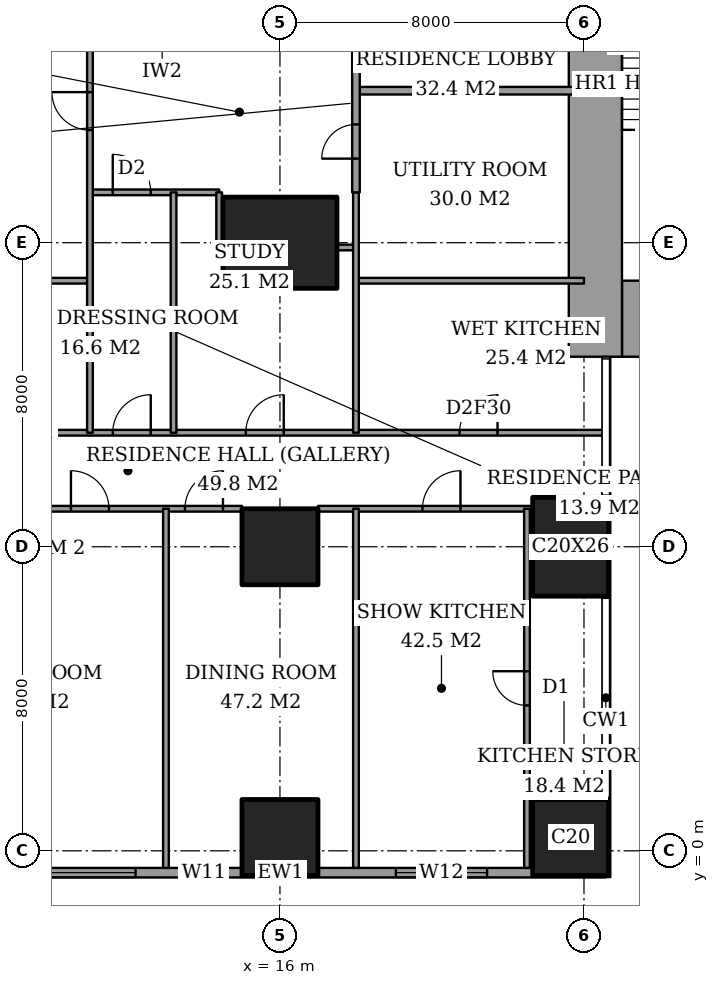
"""IFC4 building model, lengths in metres.
Left out: names, types, materials, properties, quantities, classifications, styles, units other than length and angle.
Written with IfcOpenShell. Run it as: python <this file> out.ifc"""

import sys

from ifc_helpers import new_model, si_unit, direction, frame, frame_2d, origin, origin_2d, place, context, subcontext, project, spatial, rectangle, extrude, element, fill, save


model = new_model("IFC4")
c1 = context("Model", 3, precision=1e-05, world=origin(), true_north=direction((0.0, 1.0)))
c2 = subcontext(c1, "Body", "Model", "MODEL_VIEW")
j1 = project(units=[si_unit("LENGTHUNIT", "METRE"), si_unit("PLANEANGLEUNIT", "RADIAN")], contexts=[c1])
p1 = place(None, origin())
s1 = spatial("IfcSite", under=j1, at=p1, CompositionType="ELEMENT")
p2 = place(p1, origin())
s2 = spatial("IfcBuilding", under=s1, at=p2, CompositionType="ELEMENT")
p3 = place(p2, frame((0.0, 0.0, 143.0)))
s3 = spatial("IfcBuildingStorey", under=s2, at=p3, CompositionType="ELEMENT", Elevation=143.0)
for number, where, z_axis, x_axis in (
    (1, (16.0, 0.35, 0.0), (0.0, 0.0, 1.0), (1.0, 0.0, 0.0)),
    (2, (16.0, 8.0, 0.0), (0.0, 0.0, 1.0), (1.0, 0.0, 0.0)),
):
    element("IfcColumn", number, at=place(p3, frame(where, z_axis=z_axis, x_axis=x_axis)), inside=s3, PredefinedType="COLUMN", context=c2, shape_type="SweptSolid", body=[
        extrude(rectangle(XDim=2.0, YDim=2.0, at=origin_2d()), origin(), (0.0, 0.0, 1.0), 3.6),
    ])
p4 = place(p3, frame((16.0, 16.0, 0.0), z_axis=(0.0, 0.0, 1.0), x_axis=(1.0, 0.0, 0.0)))
e3 = element("IfcColumn", 3, at=p4, inside=s3, PredefinedType="COLUMN", context=c2, shape_type="SweptSolid", body=[
    extrude(rectangle(XDim=3.0, YDim=2.4, at=origin_2d()), origin(), (0.0, 0.0, 1.0), 3.6),
])
p5 = place(p3, frame((23.65, 0.35, 0.0), z_axis=(0.0, 0.0, 1.0), x_axis=(1.0, 0.0, 0.0)))
e4 = element("IfcColumn", 4, at=p5, inside=s3, PredefinedType="COLUMN", context=c2, shape_type="SweptSolid", body=[
    extrude(rectangle(XDim=2.0, YDim=2.0, at=origin_2d()), origin(), (0.0, 0.0, 1.0), 3.6),
])
p6 = place(p3, frame((23.65, 8.0, 0.0), z_axis=(0.0, 0.0, 1.0), x_axis=(1.0, 0.0, 0.0)))
e5 = element("IfcColumn", 5, at=p6, inside=s3, PredefinedType="COLUMN", context=c2, shape_type="SweptSolid", body=[
    extrude(rectangle(XDim=2.0, YDim=2.6, at=origin_2d()), origin(), (0.0, 0.0, 1.0), 3.6),
])
p7 = place(p3, frame((25.0, 14.0, 0.0), z_axis=(0.0, 0.0, 1.0), x_axis=(1.0, 0.0, 0.0)))
e6 = element("IfcWall", 6, at=p7, inside=s3, PredefinedType="SHEAR", context=c2, shape_type="SweptSolid", body=[
    extrude(rectangle(XDim=3.15, YDim=2.0, at=frame_2d((1.575, 0.0))), origin(), (0.0, 0.0, 1.0), 3.6),
])
p8 = place(p3, frame((24.3, 13.0, 0.0), z_axis=(0.0, 0.0, 1.0), x_axis=(0.0, 1.0, 0.0)))
e7 = element("IfcWall", 7, at=p8, inside=s3, PredefinedType="SHEAR", context=c2, shape_type="SweptSolid", body=[
    extrude(rectangle(XDim=10.15, YDim=1.4, at=frame_2d((5.075, 0.0))), origin(), (0.0, 0.0, 1.0), 3.6),
])
p9 = place(p3, frame((3.175, -0.575, 0.0), z_axis=(0.0, 0.0, 1.0), x_axis=(1.0, 0.0, 0.0)))
e8 = element("IfcWall", 8, at=p9, inside=s3, PredefinedType="SOLIDWALL", context=c2, shape_type="SweptSolid", body=[
    extrude(rectangle(XDim=21.4, YDim=0.25, at=frame_2d((10.7, 0.0))), origin(), (0.0, 0.0, 1.0), 3.6),
])
p10 = place(p9, frame((0.775, 0.0, 0.4)))
e9 = element("IfcOpeningElement", 9, at=p10, cuts=e8, PredefinedType="OPENING", context=c2, shape_type="SweptSolid", body=[
    extrude(rectangle(XDim=1.2, YDim=2.2, at=frame_2d((0.6, 1.1))), frame((0.0, 0.135, 0.0), z_axis=(0.0, -1.0, 0.0), x_axis=(1.0, 0.0, 0.0)), (0.0, 0.0, 1.0), 0.27),
])
p11 = place(p9, frame((6.625, 0.0, 0.4)))
e10 = element("IfcOpeningElement", 10, at=p11, cuts=e8, PredefinedType="OPENING", context=c2, shape_type="SweptSolid", body=[
    extrude(rectangle(XDim=2.4, YDim=2.2, at=frame_2d((1.2, 1.1))), frame((0.0, 0.135, 0.0), z_axis=(0.0, -1.0, 0.0), x_axis=(1.0, 0.0, 0.0)), (0.0, 0.0, 1.0), 0.27),
])
p12 = place(p9, frame((10.225, 0.0, 0.4)))
e11 = element("IfcOpeningElement", 11, at=p12, cuts=e8, PredefinedType="OPENING", context=c2, shape_type="SweptSolid", body=[
    extrude(rectangle(XDim=1.2, YDim=2.2, at=frame_2d((0.6, 1.1))), frame((0.0, 0.135, 0.0), z_axis=(0.0, -1.0, 0.0), x_axis=(1.0, 0.0, 0.0)), (0.0, 0.0, 1.0), 0.27),
])
p13 = place(p9, frame((15.875, 0.0, 0.4)))
e12 = element("IfcOpeningElement", 12, at=p13, cuts=e8, PredefinedType="OPENING", context=c2, shape_type="SweptSolid", body=[
    extrude(rectangle(XDim=2.4, YDim=2.2, at=frame_2d((1.2, 1.1))), frame((0.0, 0.135, 0.0), z_axis=(0.0, -1.0, 0.0), x_axis=(1.0, 0.0, 0.0)), (0.0, 0.0, 1.0), 0.27),
])
p14 = place(p3, frame((9.0, 9.0, 0.0), z_axis=(0.0, 0.0, 1.0), x_axis=(1.0, 0.0, 0.0)))
e13 = element("IfcWall", 13, at=p14, inside=s3, PredefinedType="PARTITIONING", context=c2, shape_type="SweptSolid", body=[
    extrude(rectangle(XDim=6.0, YDim=0.15, at=frame_2d((3.0, 0.0))), origin(), (0.0, 0.0, 1.0), 3.35),
])
p15 = place(p14, frame((1.5, 0.0, 0.0)))
e14 = element("IfcOpeningElement", 14, at=p15, cuts=e13, PredefinedType="OPENING", context=c2, shape_type="SweptSolid", body=[
    extrude(rectangle(XDim=1.0, YDim=2.1, at=frame_2d((0.5, 1.05))), frame((0.0, 0.085, 0.0), z_axis=(0.0, -1.0, 0.0), x_axis=(1.0, 0.0, 0.0)), (0.0, 0.0, 1.0), 0.17),
])
p16 = place(p14, frame((4.5, 0.0, 0.0)))
e15 = element("IfcOpeningElement", 15, at=p16, cuts=e13, PredefinedType="OPENING", context=c2, shape_type="SweptSolid", body=[
    extrude(rectangle(XDim=1.0, YDim=2.1, at=frame_2d((0.5, 1.05))), frame((0.0, 0.085, 0.0), z_axis=(0.0, -1.0, 0.0), x_axis=(1.0, 0.0, 0.0)), (0.0, 0.0, 1.0), 0.17),
])
p17 = place(p3, frame((17.0, 9.0, 0.0), z_axis=(0.0, 0.0, 1.0), x_axis=(1.0, 0.0, 0.0)))
e16 = element("IfcWall", 16, at=p17, inside=s3, PredefinedType="PARTITIONING", context=c2, shape_type="SweptSolid", body=[
    extrude(rectangle(XDim=5.65, YDim=0.15, at=frame_2d((2.825, 0.0))), origin(), (0.0, 0.0, 1.0), 3.35),
])
p18 = place(p17, frame((2.75, 0.0, 0.0)))
e17 = element("IfcOpeningElement", 17, at=p18, cuts=e16, PredefinedType="OPENING", context=c2, shape_type="SweptSolid", body=[
    extrude(rectangle(XDim=1.0, YDim=2.1, at=frame_2d((0.5, 1.05))), frame((0.0, 0.085, 0.0), z_axis=(0.0, -1.0, 0.0), x_axis=(1.0, 0.0, 0.0)), (0.0, 0.0, 1.0), 0.17),
])
p19 = place(p3, frame((-0.45, 11.0, 0.0), z_axis=(0.0, 0.0, 1.0), x_axis=(1.0, 0.0, 0.0)))
e18 = element("IfcWall", 18, at=p19, inside=s3, PredefinedType="PARTITIONING", context=c2, shape_type="SweptSolid", body=[
    extrude(rectangle(XDim=25.011, YDim=0.15, at=frame_2d((12.505, 0.0))), origin(), (0.0, 0.0, 1.0), 3.35),
])
p20 = place(p19, frame((12.05, 0.0, 0.0)))
e19 = element("IfcOpeningElement", 19, at=p20, cuts=e18, PredefinedType="OPENING", context=c2, shape_type="SweptSolid", body=[
    extrude(rectangle(XDim=1.0, YDim=2.1, at=frame_2d((0.5, 1.05))), frame((0.0, 0.085, 0.0), z_axis=(0.0, -1.0, 0.0), x_axis=(1.0, 0.0, 0.0)), (0.0, 0.0, 1.0), 0.17),
])
p21 = place(p19, frame((3.087, 0.0, 0.0)))
e20 = element("IfcOpeningElement", 20, at=p21, cuts=e18, PredefinedType="OPENING", context=c2, shape_type="SweptSolid", body=[
    extrude(rectangle(XDim=1.0, YDim=2.1, at=frame_2d((0.5, 1.05))), frame((0.0, 0.085, 0.0), z_axis=(0.0, -1.0, 0.0), x_axis=(1.0, 0.0, 0.0)), (0.0, 0.0, 1.0), 0.17),
])
p22 = place(p19, frame((15.55, 0.0, 0.0)))
e21 = element("IfcOpeningElement", 21, at=p22, cuts=e18, PredefinedType="OPENING", context=c2, shape_type="SweptSolid", body=[
    extrude(rectangle(XDim=1.0, YDim=2.1, at=frame_2d((0.5, 1.05))), frame((0.0, 0.085, 0.0), z_axis=(0.0, -1.0, 0.0), x_axis=(1.0, 0.0, 0.0)), (0.0, 0.0, 1.0), 0.17),
])
p23 = place(p19, frame((21.175, 0.0, 0.0)))
e22 = element("IfcOpeningElement", 22, at=p23, cuts=e18, PredefinedType="OPENING", context=c2, shape_type="SweptSolid", body=[
    extrude(rectangle(XDim=1.0, YDim=2.1, at=frame_2d((0.5, 1.05))), frame((0.0, 0.085, 0.0), z_axis=(0.0, -1.0, 0.0), x_axis=(1.0, 0.0, 0.0)), (0.0, 0.0, 1.0), 0.17),
])
p24 = place(p3, frame((9.5, 15.0, 0.0), z_axis=(0.0, 0.0, 1.0), x_axis=(1.0, 0.0, 0.0)))
e23 = element("IfcWall", 23, at=p24, inside=s3, PredefinedType="PARTITIONING", context=c2, shape_type="SweptSolid", body=[
    extrude(rectangle(XDim=1.5, YDim=0.15, at=frame_2d((0.75, 0.0))), origin(), (0.0, 0.0, 1.0), 3.35),
])
p25 = place(p3, frame((18.0, 15.0, 0.0), z_axis=(0.0, 0.0, 1.0), x_axis=(1.0, 0.0, 0.0)))
e24 = element("IfcWall", 24, at=p25, inside=s3, PredefinedType="PARTITIONING", context=c2, shape_type="SweptSolid", body=[
    extrude(rectangle(XDim=6.0, YDim=0.15, at=frame_2d((3.0, 0.0))), origin(), (0.0, 0.0, 1.0), 3.35),
])
p26 = place(p3, frame((17.5, 15.875, 0.0), z_axis=(0.0, 0.0, 1.0), x_axis=(1.0, 0.0, 0.0)))
e25 = element("IfcWall", 25, at=p26, inside=s3, PredefinedType="PARTITIONING", context=c2, shape_type="SweptSolid", body=[
    extrude(rectangle(XDim=0.5, YDim=0.15, at=frame_2d((0.25, 0.0))), origin(), (0.0, 0.0, 1.0), 2.634),
])
p27 = place(p3, frame((11.0, 17.325, 0.0), z_axis=(0.0, 0.0, 1.0), x_axis=(1.0, 0.0, 0.0)))
e26 = element("IfcWall", 26, at=p27, inside=s3, PredefinedType="PARTITIONING", context=c2, shape_type="SweptSolid", body=[
    extrude(rectangle(XDim=3.4, YDim=0.15, at=frame_2d((1.7, 0.0))), origin(), (0.0, 0.0, 1.0), 3.35),
])
p28 = place(p27, frame((0.6, 0.0, 0.0)))
e27 = element("IfcOpeningElement", 27, at=p28, cuts=e26, PredefinedType="OPENING", context=c2, shape_type="SweptSolid", body=[
    extrude(rectangle(XDim=1.0, YDim=2.1, at=frame_2d((0.5, 1.05))), frame((0.0, 0.085, 0.0), z_axis=(0.0, -1.0, 0.0), x_axis=(1.0, 0.0, 0.0)), (0.0, 0.0, 1.0), 0.17),
])
p29 = place(p3, frame((18.0, 20.0, 0.0), z_axis=(0.0, 0.0, 1.0), x_axis=(1.0, 0.0, 0.0)))
e28 = element("IfcWall", 28, at=p29, inside=s3, PredefinedType="PARTITIONING", context=c2, shape_type="SweptSolid", body=[
    extrude(rectangle(XDim=6.0, YDim=0.2, at=frame_2d((3.0, 0.0))), origin(), (0.0, 0.0, 1.0), 3.35),
])
p30 = place(p3, frame((11.0, 11.0, 0.0), z_axis=(0.0, 0.0, 1.0), x_axis=(0.0, 1.0, 0.0)))
e29 = element("IfcWall", 29, at=p30, inside=s3, PredefinedType="PARTITIONING", context=c2, shape_type="SweptSolid", body=[
    extrude(rectangle(XDim=10.6, YDim=0.15, at=frame_2d((5.3, 0.0))), origin(), (0.0, 0.0, 1.0), 3.35),
])
p31 = place(p30, frame((7.962, 0.0, 0.0)))
e30 = element("IfcOpeningElement", 30, at=p31, cuts=e29, PredefinedType="OPENING", context=c2, shape_type="SweptSolid", body=[
    extrude(rectangle(XDim=1.0, YDim=2.1, at=frame_2d((0.5, 1.05))), frame((0.0, 0.085, 0.0), z_axis=(0.0, -1.0, 0.0), x_axis=(1.0, 0.0, 0.0)), (0.0, 0.0, 1.0), 0.17),
])
p32 = place(p3, frame((13.0, -0.45, 0.0), z_axis=(0.0, 0.0, 1.0), x_axis=(0.0, 1.0, 0.0)))
e31 = element("IfcWall", 31, at=p32, inside=s3, PredefinedType="PARTITIONING", context=c2, shape_type="SweptSolid", body=[
    extrude(rectangle(XDim=9.45, YDim=0.15, at=frame_2d((4.725, 0.0))), origin(), (0.0, 0.0, 1.0), 3.35),
])
p33 = place(p3, frame((13.2, 11.0, 0.0), z_axis=(0.0, 0.0, 1.0), x_axis=(0.0, 1.0, 0.0)))
e32 = element("IfcWall", 32, at=p33, inside=s3, PredefinedType="PARTITIONING", context=c2, shape_type="SweptSolid", body=[
    extrude(rectangle(XDim=6.325, YDim=0.15, at=frame_2d((3.163, 0.0))), origin(), (0.0, 0.0, 1.0), 3.35),
])
p34 = place(p3, frame((14.4, 15.875, 0.0), z_axis=(0.0, 0.0, 1.0), x_axis=(0.0, 1.0, 0.0)))
e33 = element("IfcWall", 33, at=p34, inside=s3, PredefinedType="PARTITIONING", context=c2, shape_type="SweptSolid", body=[
    extrude(rectangle(XDim=1.45, YDim=0.15, at=frame_2d((0.725, 0.0))), origin(), (0.0, 0.0, 1.0), 3.35),
])
p35 = place(p3, frame((18.0, 17.325, 0.0), z_axis=(0.0, 0.0, 1.0), x_axis=(0.0, 1.0, 0.0)))
e34 = element("IfcWall", 34, at=p35, inside=s3, PredefinedType="PARTITIONING", context=c2, shape_type="SweptSolid", body=[
    extrude(rectangle(XDim=6.675, YDim=0.2, at=frame_2d((3.337, 0.0))), origin(), (0.0, 0.0, 1.0), 3.35),
])
p36 = place(p35, frame((4.075, 0.0, 0.0)))
e35 = element("IfcOpeningElement", 35, at=p36, cuts=e34, PredefinedType="OPENING", context=c2, shape_type="SweptSolid", body=[
    extrude(rectangle(XDim=1.2, YDim=2.4, at=frame_2d((0.6, 1.2))), frame((0.0, 0.11, 0.0), z_axis=(0.0, -1.0, 0.0), x_axis=(1.0, 0.0, 0.0)), (0.0, 0.0, 1.0), 0.22),
])
p37 = place(p35, frame((0.887, 0.0, 0.0)))
e36 = element("IfcOpeningElement", 36, at=p37, cuts=e34, PredefinedType="OPENING", context=c2, shape_type="SweptSolid", body=[
    extrude(rectangle(XDim=0.9, YDim=2.1, at=frame_2d((0.45, 1.05))), frame((0.0, 0.11, 0.0), z_axis=(0.0, -1.0, 0.0), x_axis=(1.0, 0.0, 0.0)), (0.0, 0.0, 1.0), 0.22),
])
p38 = place(p3, frame((18.0, -0.45, 0.0), z_axis=(0.0, 0.0, 1.0), x_axis=(0.0, 1.0, 0.0)))
e37 = element("IfcWall", 37, at=p38, inside=s3, PredefinedType="PARTITIONING", context=c2, shape_type="SweptSolid", body=[
    extrude(rectangle(XDim=9.45, YDim=0.15, at=frame_2d((4.725, 0.0))), origin(), (0.0, 0.0, 1.0), 3.35),
])
p39 = place(p3, frame((18.0, 11.0, 0.0), z_axis=(0.0, 0.0, 1.0), x_axis=(0.0, 1.0, 0.0)))
e38 = element("IfcWall", 38, at=p39, inside=s3, PredefinedType="PARTITIONING", context=c2, shape_type="SweptSolid", body=[
    extrude(rectangle(XDim=6.325, YDim=0.15, at=frame_2d((3.163, 0.0))), origin(), (0.0, 0.0, 1.0), 3.35),
])
p40 = place(p3, frame((22.5, -0.45, 0.0), z_axis=(0.0, 0.0, 1.0), x_axis=(0.0, 1.0, 0.0)))
e39 = element("IfcWall", 39, at=p40, inside=s3, PredefinedType="PARTITIONING", context=c2, shape_type="SweptSolid", body=[
    extrude(rectangle(XDim=9.45, YDim=0.15, at=frame_2d((4.725, 0.0))), origin(), (0.0, 0.0, 1.0), 3.35),
])
p41 = place(p40, frame((4.275, 0.0, 0.0)))
e40 = element("IfcOpeningElement", 40, at=p41, cuts=e39, PredefinedType="OPENING", context=c2, shape_type="SweptSolid", body=[
    extrude(rectangle(XDim=0.9, YDim=2.1, at=frame_2d((0.45, 1.05))), frame((0.0, 0.085, 0.0), z_axis=(0.0, -1.0, 0.0), x_axis=(1.0, 0.0, 0.0)), (0.0, 0.0, 1.0), 0.17),
])
p42 = place(p11, origin())
e41 = element("IfcWindow", 41, at=p42, inside=s3, PartitioningType="SINGLE_PANEL", PredefinedType="WINDOW", context=c2, shape_type="SweptSolid", body=[
    extrude(rectangle(XDim=2.4, YDim=2.2, at=frame_2d((1.2, 1.1))), frame((0.0, 0.03, 0.0), z_axis=(0.0, -1.0, 0.0), x_axis=(1.0, 0.0, 0.0)), (0.0, 0.0, 1.0), 0.06),
])
fill(e10, e41)
p43 = place(p12, origin())
e42 = element("IfcWindow", 42, at=p43, inside=s3, PartitioningType="SINGLE_PANEL", PredefinedType="WINDOW", context=c2, shape_type="SweptSolid", body=[
    extrude(rectangle(XDim=1.2, YDim=2.2, at=frame_2d((0.6, 1.1))), frame((0.0, 0.03, 0.0), z_axis=(0.0, -1.0, 0.0), x_axis=(1.0, 0.0, 0.0)), (0.0, 0.0, 1.0), 0.06),
])
fill(e11, e42)
p44 = place(p13, origin())
e43 = element("IfcWindow", 43, at=p44, inside=s3, PartitioningType="SINGLE_PANEL", PredefinedType="WINDOW", context=c2, shape_type="SweptSolid", body=[
    extrude(rectangle(XDim=2.4, YDim=2.2, at=frame_2d((1.2, 1.1))), frame((0.0, 0.03, 0.0), z_axis=(0.0, -1.0, 0.0), x_axis=(1.0, 0.0, 0.0)), (0.0, 0.0, 1.0), 0.06),
])
fill(e12, e43)
p45 = place(p15, origin())
e44 = element("IfcDoor", 44, at=p45, inside=s3, OperationType="SINGLE_SWING_RIGHT", PredefinedType="DOOR", context=c2, shape_type="SweptSolid", body=[
    extrude(rectangle(XDim=1.0, YDim=2.1, at=frame_2d((0.5, 1.05))), frame((0.0, 0.025, 0.0), z_axis=(0.0, -1.0, 0.0), x_axis=(1.0, 0.0, 0.0)), (0.0, 0.0, 1.0), 0.05),
])
fill(e14, e44)
p46 = place(p16, origin())
e45 = element("IfcDoor", 45, at=p46, inside=s3, OperationType="SINGLE_SWING_LEFT", PredefinedType="DOOR", context=c2, shape_type="SweptSolid", body=[
    extrude(rectangle(XDim=1.0, YDim=2.1, at=frame_2d((0.5, 1.05))), frame((0.0, 0.025, 0.0), z_axis=(0.0, -1.0, 0.0), x_axis=(1.0, 0.0, 0.0)), (0.0, 0.0, 1.0), 0.05),
])
fill(e15, e45)
p47 = place(p18, origin())
e46 = element("IfcDoor", 46, at=p47, inside=s3, OperationType="SINGLE_SWING_LEFT", PredefinedType="DOOR", context=c2, shape_type="SweptSolid", body=[
    extrude(rectangle(XDim=1.0, YDim=2.1, at=frame_2d((0.5, 1.05))), frame((0.0, 0.025, 0.0), z_axis=(0.0, -1.0, 0.0), x_axis=(1.0, 0.0, 0.0)), (0.0, 0.0, 1.0), 0.05),
])
fill(e17, e46)
p48 = place(p41, origin())
e47 = element("IfcDoor", 47, at=p48, inside=s3, OperationType="SINGLE_SWING_LEFT", PredefinedType="DOOR", context=c2, shape_type="SweptSolid", body=[
    extrude(rectangle(XDim=0.9, YDim=2.1, at=frame_2d((0.45, 1.05))), frame((0.0, 0.025, 0.0), z_axis=(0.0, -1.0, 0.0), x_axis=(1.0, 0.0, 0.0)), (0.0, 0.0, 1.0), 0.05),
])
fill(e40, e47)
p49 = place(p20, origin())
e48 = element("IfcDoor", 48, at=p49, inside=s3, OperationType="SINGLE_SWING_LEFT", PredefinedType="DOOR", context=c2, shape_type="SweptSolid", body=[
    extrude(rectangle(XDim=1.0, YDim=2.1, at=frame_2d((0.5, 1.05))), frame((0.0, 0.025, 0.0), z_axis=(0.0, -1.0, 0.0), x_axis=(1.0, 0.0, 0.0)), (0.0, 0.0, 1.0), 0.05),
])
fill(e19, e48)
p50 = place(p31, origin())
e49 = element("IfcDoor", 49, at=p50, inside=s3, OperationType="SINGLE_SWING_LEFT", PredefinedType="DOOR", context=c2, shape_type="SweptSolid", body=[
    extrude(rectangle(XDim=1.0, YDim=2.1, at=frame_2d((0.5, 1.05))), frame((0.0, 0.025, 0.0), z_axis=(0.0, -1.0, 0.0), x_axis=(1.0, 0.0, 0.0)), (0.0, 0.0, 1.0), 0.05),
])
fill(e30, e49)
p51 = place(p28, origin())
e50 = element("IfcDoor", 50, at=p51, inside=s3, OperationType="SINGLE_SWING_RIGHT", PredefinedType="DOOR", context=c2, shape_type="SweptSolid", body=[
    extrude(rectangle(XDim=1.0, YDim=2.1, at=frame_2d((0.5, 1.05))), frame((0.0, 0.025, 0.0), z_axis=(0.0, -1.0, 0.0), x_axis=(1.0, 0.0, 0.0)), (0.0, 0.0, 1.0), 0.05),
])
fill(e27, e50)
p52 = place(p22, origin())
e51 = element("IfcDoor", 51, at=p52, inside=s3, OperationType="SINGLE_SWING_LEFT", PredefinedType="DOOR", context=c2, shape_type="SweptSolid", body=[
    extrude(rectangle(XDim=1.0, YDim=2.1, at=frame_2d((0.5, 1.05))), frame((0.0, 0.025, 0.0), z_axis=(0.0, -1.0, 0.0), x_axis=(1.0, 0.0, 0.0)), (0.0, 0.0, 1.0), 0.05),
])
fill(e21, e51)
p53 = place(p23, origin())
e52 = element("IfcDoor", 52, at=p53, inside=s3, OperationType="SINGLE_SWING_LEFT", PredefinedType="DOOR", context=c2, shape_type="SweptSolid", body=[
    extrude(rectangle(XDim=1.0, YDim=2.1, at=frame_2d((0.5, 1.05))), frame((0.0, 0.025, 0.0), z_axis=(0.0, -1.0, 0.0), x_axis=(1.0, 0.0, 0.0)), (0.0, 0.0, 1.0), 0.05),
])
fill(e22, e52)
p54 = place(p37, origin())
e53 = element("IfcDoor", 53, at=p54, inside=s3, OperationType="SINGLE_SWING_RIGHT", PredefinedType="DOOR", context=c2, shape_type="SweptSolid", body=[
    extrude(rectangle(XDim=0.9, YDim=2.1, at=frame_2d((0.45, 1.05))), frame((0.0, 0.025, 0.0), z_axis=(0.0, -1.0, 0.0), x_axis=(1.0, 0.0, 0.0)), (0.0, 0.0, 1.0), 0.05),
])
fill(e36, e53)
save(model, sys.argv[1])
